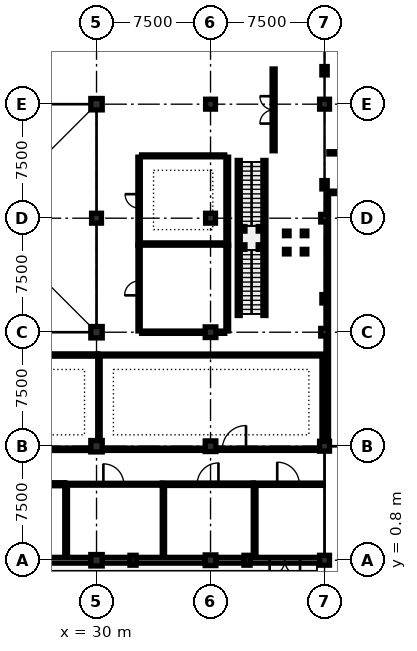
"""IFC4 building model, lengths in metres.
Left out: names, types, materials, properties, quantities, classifications, styles, units other than length and angle.
Written with IfcOpenShell. Run it as: python <this file> out.ifc"""

import sys

from ifc_helpers import new_model, si_unit, direction, frame, frame_2d, origin, origin_2d, place, context, subcontext, project, spatial, rectangle, i_section, extrude, element, fill, save


model = new_model("IFC4")
c1 = context("Model", 3, precision=1e-05, world=origin(), true_north=direction((0.0, 1.0)))
c2 = subcontext(c1, "Body", "Model", "MODEL_VIEW")
j1 = project(units=[si_unit("LENGTHUNIT", "METRE"), si_unit("PLANEANGLEUNIT", "RADIAN")], contexts=[c1])
p1 = place(None, origin())
s1 = spatial("IfcSite", under=j1, at=p1, CompositionType="ELEMENT")
p2 = place(p1, origin())
s2 = spatial("IfcBuilding", under=s1, at=p2, CompositionType="ELEMENT")
p3 = place(p2, origin())
s3 = spatial("IfcBuildingStorey", under=s2, at=p3, CompositionType="ELEMENT", Elevation=0.0)
for number, where, z_axis, x_axis in (
    (1, (30.0, 0.8, 0.0), (0.0, 0.0, 1.0), (1.0, 0.0, 0.0)),
    (2, (30.0, 8.3, 0.0), (0.0, 0.0, 1.0), (1.0, 0.0, 0.0)),
    (3, (30.0, 15.8, 0.0), (0.0, 0.0, 1.0), (1.0, 0.0, 0.0)),
):
    element("IfcColumn", number, at=place(p3, frame(where, z_axis=z_axis, x_axis=x_axis)), inside=s3, PredefinedType="COLUMN", context=c2, shape_type="SweptSolid", body=[
        extrude(rectangle(XDim=0.75, YDim=0.75, at=origin_2d()), origin(), (0.0, 0.0, 1.0), 4.7),
    ])
p4 = place(p3, frame((30.0, 23.3, 0.0), z_axis=(0.0, 0.0, 1.0), x_axis=(1.0, 0.0, 0.0)))
e4 = element("IfcColumn", 4, at=p4, inside=s3, PredefinedType="COLUMN", context=c2, shape_type="SweptSolid", body=[
    extrude(rectangle(XDim=0.65, YDim=0.65, at=origin_2d()), origin(), (0.0, 0.0, 1.0), 4.7),
])
p5 = place(p3, frame((30.0, 30.8, 0.0), z_axis=(0.0, 0.0, 1.0), x_axis=(1.0, 0.0, 0.0)))
e5 = element("IfcColumn", 5, at=p5, inside=s3, PredefinedType="COLUMN", context=c2, shape_type="SweptSolid", body=[
    extrude(rectangle(XDim=0.75, YDim=0.75, at=origin_2d()), origin(), (0.0, 0.0, 1.0), 4.7),
])
for number, where, z_axis, x_axis in (
    (6, (37.5, 0.8, 0.0), (0.0, 0.0, 1.0), (1.0, 0.0, 0.0)),
    (7, (37.5, 8.3, 0.0), (0.0, 0.0, 1.0), (1.0, 0.0, 0.0)),
    (8, (37.5, 15.8, 0.0), (0.0, 0.0, 1.0), (1.0, 0.0, 0.0)),
):
    element("IfcColumn", number, at=place(p3, frame(where, z_axis=z_axis, x_axis=x_axis)), inside=s3, PredefinedType="COLUMN", context=c2, shape_type="SweptSolid", body=[
        extrude(rectangle(XDim=0.7, YDim=0.7, at=origin_2d()), origin(), (0.0, 0.0, 1.0), 4.7),
    ])
for number, where, z_axis, x_axis in (
    (9, (37.5, 23.3, 0.0), (0.0, 0.0, 1.0), (1.0, 0.0, 0.0)),
    (10, (37.5, 30.8, 0.0), (0.0, 0.0, 1.0), (1.0, 0.0, 0.0)),
    (11, (45.0, 0.8, 0.0), (0.0, 0.0, 1.0), (1.0, 0.0, 0.0)),
    (12, (45.0, 8.3, 0.0), (0.0, 0.0, 1.0), (1.0, 0.0, 0.0)),
):
    element("IfcColumn", number, at=place(p3, frame(where, z_axis=z_axis, x_axis=x_axis)), inside=s3, PredefinedType="COLUMN", context=c2, shape_type="SweptSolid", body=[
        extrude(rectangle(XDim=0.65, YDim=0.65, at=origin_2d()), origin(), (0.0, 0.0, 1.0), 4.7),
    ])
for number, where, z_axis, x_axis in (
    (13, (45.0, 15.8, 0.0), (0.0, 0.0, 1.0), (1.0, 0.0, 0.0)),
    (14, (45.0, 23.3, 0.0), (0.0, 0.0, 1.0), (1.0, 0.0, 0.0)),
):
    element("IfcColumn", number, at=place(p3, frame(where, z_axis=z_axis, x_axis=x_axis)), inside=s3, PredefinedType="COLUMN", context=c2, shape_type="SweptSolid", body=[
        extrude(rectangle(XDim=0.5, YDim=0.5, at=origin_2d()), origin(), (0.0, 0.0, 1.0), 6.138),
    ])
p6 = place(p3, frame((45.0, 30.8, 0.0), z_axis=(0.0, 0.0, 1.0), x_axis=(1.0, 0.0, 0.0)))
e15 = element("IfcColumn", 15, at=p6, inside=s3, PredefinedType="COLUMN", context=c2, shape_type="SweptSolid", body=[
    extrude(rectangle(XDim=0.65, YDim=0.65, at=origin_2d()), origin(), (0.0, 0.0, 1.0), 4.7),
])
for number, where, z_axis, x_axis in (
    (16, (32.4, 0.8, 0.0), (0.0, 0.0, 1.0), (1.0, 0.0, 0.0)),
    (17, (39.9, 0.8, 0.0), (0.0, 0.0, 1.0), (1.0, 0.0, 0.0)),
):
    element("IfcColumn", number, at=place(p3, frame(where, z_axis=z_axis, x_axis=x_axis)), inside=s3, PredefinedType="PILASTER", context=c2, shape_type="SweptSolid", body=[
        extrude(rectangle(XDim=0.4, YDim=0.65, at=origin_2d()), origin(), (0.0, 0.0, 1.0), 4.7),
    ])
for number, where, z_axis, x_axis in (
    (18, (45.0, 18.0, 0.0), (0.0, 0.0, 1.0), (1.0, 0.0, 0.0)),
    (19, (45.0, 25.5, 0.0), (0.0, 0.0, 1.0), (1.0, 0.0, 0.0)),
    (20, (45.0, 33.0, 0.0), (0.0, 0.0, 1.0), (1.0, 0.0, 0.0)),
):
    element("IfcColumn", number, at=place(p3, frame(where, z_axis=z_axis, x_axis=x_axis)), inside=s3, PredefinedType="PILASTER", context=c2, shape_type="SweptSolid", body=[
        extrude(rectangle(XDim=0.35, YDim=0.55, at=origin_2d()), origin(), (0.0, 0.0, 1.0), 4.7),
    ])
p7 = place(p3, frame((44.675, 0.8, 0.0), z_axis=(0.0, 0.0, 1.0), x_axis=(-1.0, 0.0, 0.0)))
e21 = element("IfcWall", 21, at=p7, inside=s3, PredefinedType="SOLIDWALL", context=c2, shape_type="SweptSolid", body=[
    extrude(rectangle(XDim=4.575, YDim=0.38, at=frame_2d((2.288, 0.0))), origin(), (0.0, 0.0, 1.0), 4.035),
])
p8 = place(p7, frame((1.288, 0.0, 0.0)))
e22 = element("IfcOpeningElement", 22, at=p8, cuts=e21, PredefinedType="OPENING", context=c2, shape_type="SweptSolid", body=[
    extrude(rectangle(XDim=2.0, YDim=2.35, at=frame_2d((1.0, 1.175))), frame((0.0, 0.202, 0.0), z_axis=(0.0, -1.0, 0.0), x_axis=(1.0, 0.0, 0.0)), (0.0, 0.0, 1.0), 0.404),
])
p9 = place(p3, frame((39.7, 0.8, 0.0), z_axis=(0.0, 0.0, 1.0), x_axis=(-1.0, 0.0, 0.0)))
e23 = element("IfcWall", 23, at=p9, inside=s3, PredefinedType="SOLIDWALL", context=c2, shape_type="SweptSolid", body=[
    extrude(rectangle(XDim=1.85, YDim=0.38, at=frame_2d((0.925, 0.0))), origin(), (0.0, 0.0, 1.0), 4.035),
])
p10 = place(p3, frame((37.15, 0.8, 0.0), z_axis=(0.0, 0.0, 1.0), x_axis=(-1.0, 0.0, 0.0)))
e24 = element("IfcWall", 24, at=p10, inside=s3, PredefinedType="SOLIDWALL", context=c2, shape_type="SweptSolid", body=[
    extrude(rectangle(XDim=4.55, YDim=0.38, at=frame_2d((2.275, 0.0))), origin(), (0.0, 0.0, 1.0), 4.035),
])
p11 = place(p3, frame((32.2, 0.8, 0.0), z_axis=(0.0, 0.0, 1.0), x_axis=(-1.0, 0.0, 0.0)))
e25 = element("IfcWall", 25, at=p11, inside=s3, PredefinedType="SOLIDWALL", context=c2, shape_type="SweptSolid", body=[
    extrude(rectangle(XDim=1.825, YDim=0.38, at=frame_2d((0.913, 0.0))), origin(), (0.0, 0.0, 1.0), 4.035),
])
p12 = place(p3, frame((29.625, 0.8, 0.0), z_axis=(0.0, 0.0, 1.0), x_axis=(-1.0, 0.0, 0.0)))
e26 = element("IfcWall", 26, at=p12, inside=s3, PredefinedType="SOLIDWALL", context=c2, shape_type="SweptSolid", body=[
    extrude(rectangle(XDim=4.525, YDim=0.38, at=frame_2d((2.262, 0.0))), origin(), (0.0, 0.0, 1.0), 4.035),
])
for number, where, z_axis, x_axis in (
    (27, (39.355, 16.9, 0.0), (0.0, 0.0, 1.0), (0.0, 1.0, 0.0)),
    (28, (41.045, 16.9, 0.0), (0.0, 0.0, 1.0), (0.0, 1.0, 0.0)),
):
    element("IfcWall", number, at=place(p3, frame(where, z_axis=z_axis, x_axis=x_axis)), inside=s3, PredefinedType="PARTITIONING", context=c2, shape_type="SweptSolid", body=[
        extrude(rectangle(XDim=10.2, YDim=0.2, at=frame_2d((5.1, 0.0))), origin(), (0.0, 0.0, 1.0), 2.3),
    ])
for number, where, z_axis, x_axis in (
    (29, (39.615, 21.4, 0.0), (0.0, 0.0, 1.0), (1.0, 0.0, 0.0)),
    (30, (40.785, 21.4, 0.0), (0.0, 0.0, 1.0), (1.0, 0.0, 0.0)),
    (31, (40.785, 22.6, 0.0), (0.0, 0.0, 1.0), (1.0, 0.0, 0.0)),
    (32, (39.615, 22.6, 0.0), (0.0, 0.0, 1.0), (1.0, 0.0, 0.0)),
):
    element("IfcColumn", number, at=place(p3, frame(where, z_axis=z_axis, x_axis=x_axis)), inside=s3, PredefinedType="COLUMN", context=c2, shape_type="SweptSolid", body=[
        extrude(i_section(OverallWidth=0.3, OverallDepth=0.3, WebThickness=0.011, FlangeThickness=0.019, FilletRadius=0.027, at=origin_2d()), origin(), (0.0, 0.0, 1.0), 2.3),
    ])
for number, where, z_axis, x_axis in (
    (33, (42.515, 21.1, 0.0), (0.0, 0.0, 1.0), (1.0, 0.0, 0.0)),
    (34, (43.685, 21.1, 0.0), (0.0, 0.0, 1.0), (1.0, 0.0, 0.0)),
    (35, (43.685, 22.3, 0.0), (0.0, 0.0, 1.0), (1.0, 0.0, 0.0)),
    (36, (42.515, 22.3, 0.0), (0.0, 0.0, 1.0), (1.0, 0.0, 0.0)),
):
    element("IfcColumn", number, at=place(p3, frame(where, z_axis=z_axis, x_axis=x_axis)), inside=s3, PredefinedType="COLUMN", context=c2, shape_type="SweptSolid", body=[
        extrude(i_section(OverallWidth=0.3, OverallDepth=0.3, WebThickness=0.011, FlangeThickness=0.019, FilletRadius=0.027, at=origin_2d()), origin(), (0.0, 0.0, 1.0), 4.7),
    ])
p13 = place(p3, frame((21.927, 5.8, 0.0), z_axis=(0.0, 0.0, 1.0), x_axis=(1.0, 0.0, 0.0)))
e37 = element("IfcWall", 37, at=p13, inside=s3, PredefinedType="PARTITIONING", context=c2, shape_type="SweptSolid", body=[
    extrude(rectangle(XDim=5.988, YDim=0.2, at=frame_2d((2.994, 0.0))), origin(), (0.0, 0.0, 1.0), 3.765),
])
p14 = place(p13, frame((2.494, 0.0, 0.0)))
e38 = element("IfcOpeningElement", 38, at=p14, cuts=e37, PredefinedType="OPENING", context=c2, shape_type="SweptSolid", body=[
    extrude(rectangle(XDim=1.0, YDim=2.15, at=frame_2d((0.5, 1.075))), frame((0.0, 0.112, 0.0), z_axis=(0.0, -1.0, 0.0), x_axis=(1.0, 0.0, 0.0)), (0.0, 0.0, 1.0), 0.224),
])
p15 = place(p3, frame((27.927, 5.8, 0.0), z_axis=(0.0, 0.0, 1.0), x_axis=(1.0, 0.0, 0.0)))
e39 = element("IfcWall", 39, at=p15, inside=s3, PredefinedType="PARTITIONING", context=c2, shape_type="SweptSolid", body=[
    extrude(rectangle(XDim=6.388, YDim=0.125, at=frame_2d((3.194, 0.0))), origin(), (0.0, 0.0, 1.0), 3.985),
])
p16 = place(p15, frame((2.524, 0.0, 0.0)))
e40 = element("IfcOpeningElement", 40, at=p16, cuts=e39, PredefinedType="OPENING", context=c2, shape_type="SweptSolid", body=[
    extrude(rectangle(XDim=1.34, YDim=2.24, at=frame_2d((0.67, 1.12))), frame((0.0, 0.074, 0.0), z_axis=(0.0, -1.0, 0.0), x_axis=(1.0, 0.0, 0.0)), (0.0, 0.0, 1.0), 0.149),
])
p17 = place(p3, frame((34.327, 5.8, 0.0), z_axis=(0.0, 0.0, 1.0), x_axis=(1.0, 0.0, 0.0)))
e41 = element("IfcWall", 41, at=p17, inside=s3, PredefinedType="PARTITIONING", context=c2, shape_type="SweptSolid", body=[
    extrude(rectangle(XDim=5.988, YDim=0.16, at=frame_2d((2.994, 0.0))), origin(), (0.0, 0.0, 1.0), 3.985),
])
p18 = place(p17, frame((2.294, 0.0, 0.0)))
e42 = element("IfcOpeningElement", 42, at=p18, cuts=e41, PredefinedType="OPENING", context=c2, shape_type="SweptSolid", body=[
    extrude(rectangle(XDim=1.4, YDim=2.25, at=frame_2d((0.7, 1.125))), frame((0.0, 0.092, 0.0), z_axis=(0.0, -1.0, 0.0), x_axis=(1.0, 0.0, 0.0)), (0.0, 0.0, 1.0), 0.184),
])
p19 = place(p3, frame((40.327, 5.8, 0.0), z_axis=(0.0, 0.0, 1.0), x_axis=(1.0, 0.0, 0.0)))
e43 = element("IfcWall", 43, at=p19, inside=s3, PredefinedType="PARTITIONING", context=c2, shape_type="SweptSolid", body=[
    extrude(rectangle(XDim=4.571, YDim=0.15, at=frame_2d((2.286, 0.0))), origin(), (0.0, 0.0, 1.0), 4.035),
])
p20 = place(p19, frame((1.561, 0.0, 0.0)))
e44 = element("IfcOpeningElement", 44, at=p20, cuts=e43, PredefinedType="OPENING", context=c2, shape_type="SweptSolid", body=[
    extrude(rectangle(XDim=1.45, YDim=2.26, at=frame_2d((0.725, 1.13))), frame((0.0, 0.087, 0.0), z_axis=(0.0, -1.0, 0.0), x_axis=(1.0, 0.0, 0.0)), (0.0, 0.0, 1.0), 0.174),
])
p21 = place(p3, frame((15.387, 8.1, 0.0), z_axis=(0.0, 0.0, 1.0), x_axis=(1.0, 0.0, 0.0)))
e45 = element("IfcWall", 45, at=p21, inside=s3, PredefinedType="PARTITIONING", context=c2, shape_type="SweptSolid", body=[
    extrude(rectangle(XDim=14.521, YDim=0.16, at=frame_2d((7.26, 0.0))), origin(), (0.0, 0.0, 1.0), 3.765),
])
p22 = place(p21, frame((7.682, 0.0, 0.0)))
e46 = element("IfcOpeningElement", 46, at=p22, cuts=e45, PredefinedType="OPENING", context=c2, shape_type="SweptSolid", body=[
    extrude(rectangle(XDim=1.5, YDim=2.28, at=frame_2d((0.75, 1.14))), frame((0.0, 0.092, 0.0), z_axis=(0.0, -1.0, 0.0), x_axis=(1.0, 0.0, 0.0)), (0.0, 0.0, 1.0), 0.184),
])
p23 = place(p3, frame((30.387, 8.1, 0.0), z_axis=(0.0, 0.0, 1.0), x_axis=(1.0, 0.0, 0.0)))
e47 = element("IfcWall", 47, at=p23, inside=s3, PredefinedType="PARTITIONING", context=c2, shape_type="SweptSolid", body=[
    extrude(rectangle(XDim=14.281, YDim=0.15, at=frame_2d((7.141, 0.0))), origin(), (0.0, 0.0, 1.0), 3.985),
])
p24 = place(p23, frame((7.887, 0.0, 0.0)))
e48 = element("IfcOpeningElement", 48, at=p24, cuts=e47, PredefinedType="OPENING", context=c2, shape_type="SweptSolid", body=[
    extrude(rectangle(XDim=1.56, YDim=2.3, at=frame_2d((0.78, 1.15))), frame((0.0, 0.087, 0.0), z_axis=(0.0, -1.0, 0.0), x_axis=(1.0, 0.0, 0.0)), (0.0, 0.0, 1.0), 0.174),
])
p25 = place(p3, frame((41.65, 27.735, 0.0), z_axis=(0.0, 0.0, 1.0), x_axis=(0.0, 1.0, 0.0)))
e49 = element("IfcWall", 49, at=p25, inside=s3, PredefinedType="PARTITIONING", context=c2, shape_type="SweptSolid", body=[
    extrude(rectangle(XDim=5.38, YDim=0.2, at=frame_2d((2.69, 0.0))), origin(), (0.0, 0.0, 1.0), 3.985),
])
p26 = place(p25, frame((1.79, 0.0, 0.0)))
e50 = element("IfcOpeningElement", 50, at=p26, cuts=e49, PredefinedType="OPENING", context=c2, shape_type="SweptSolid", body=[
    extrude(rectangle(XDim=1.8, YDim=2.15, at=frame_2d((0.9, 1.075))), frame((0.0, 0.112, 0.0), z_axis=(0.0, -1.0, 0.0), x_axis=(1.0, 0.0, 0.0)), (0.0, 0.0, 1.0), 0.224),
])
p27 = place(p3, frame((32.8, 15.885, 0.0), z_axis=(0.0, 0.0, 1.0), x_axis=(0.0, 1.0, 0.0)))
e51 = element("IfcWall", 51, at=p27, inside=s3, PredefinedType="PARTITIONING", context=c2, shape_type="SweptSolid", body=[
    extrude(rectangle(XDim=5.63, YDim=0.15, at=frame_2d((2.815, 0.0))), origin(), (0.0, 0.0, 1.0), 3.985),
])
p28 = place(p27, frame((2.34, 0.0, 0.0)))
e52 = element("IfcOpeningElement", 52, at=p28, cuts=e51, PredefinedType="OPENING", context=c2, shape_type="SweptSolid", body=[
    extrude(rectangle(XDim=0.95, YDim=2.15, at=frame_2d((0.475, 1.075))), frame((0.0, 0.087, 0.0), z_axis=(0.0, -1.0, 0.0), x_axis=(1.0, 0.0, 0.0)), (0.0, 0.0, 1.0), 0.174),
])
p29 = place(p3, frame((32.8, 21.527, 0.0), z_axis=(0.0, 0.0, 1.0), x_axis=(0.0, 1.0, 0.0)))
e53 = element("IfcWall", 53, at=p29, inside=s3, PredefinedType="PARTITIONING", context=c2, shape_type="SweptSolid", body=[
    extrude(rectangle(XDim=5.788, YDim=0.16, at=frame_2d((2.894, 0.0))), origin(), (0.0, 0.0, 1.0), 3.985),
])
p30 = place(p29, frame((2.434, 0.0, 0.0)))
e54 = element("IfcOpeningElement", 54, at=p30, cuts=e53, PredefinedType="OPENING", context=c2, shape_type="SweptSolid", body=[
    extrude(rectangle(XDim=0.92, YDim=2.1, at=frame_2d((0.46, 1.05))), frame((0.0, 0.092, 0.0), z_axis=(0.0, -1.0, 0.0), x_axis=(1.0, 0.0, 0.0)), (0.0, 0.0, 1.0), 0.184),
])
p31 = place(p3, frame((45.285, 25.0, 0.0), z_axis=(0.0, 0.0, 1.0), x_axis=(1.0, 0.0, 0.0)))
e55 = element("IfcWall", 55, at=p31, inside=s3, PredefinedType="PARTITIONING", context=c2, shape_type="SweptSolid", body=[
    extrude(rectangle(XDim=7.13, YDim=0.16, at=frame_2d((3.565, 0.0))), origin(), (0.0, 0.0, 1.0), 4.321),
])
p32 = place(p31, frame((3.025, 0.0, 0.0)))
e56 = element("IfcOpeningElement", 56, at=p32, cuts=e55, PredefinedType="OPENING", context=c2, shape_type="SweptSolid", body=[
    extrude(rectangle(XDim=1.08, YDim=2.18, at=frame_2d((0.54, 1.09))), frame((0.0, 0.092, 0.0), z_axis=(0.0, -1.0, 0.0), x_axis=(1.0, 0.0, 0.0)), (0.0, 0.0, 1.0), 0.184),
])
p33 = place(p3, frame((45.285, 27.6, 0.0), z_axis=(0.0, 0.0, 1.0), x_axis=(1.0, 0.0, 0.0)))
e57 = element("IfcWall", 57, at=p33, inside=s3, PredefinedType="PARTITIONING", context=c2, shape_type="SweptSolid", body=[
    extrude(rectangle(XDim=5.03, YDim=0.15, at=frame_2d((2.515, 0.0))), origin(), (0.0, 0.0, 1.0), 4.7),
])
p34 = place(p33, frame((1.895, 0.0, 0.0)))
e58 = element("IfcOpeningElement", 58, at=p34, cuts=e57, PredefinedType="OPENING", context=c2, shape_type="SweptSolid", body=[
    extrude(rectangle(XDim=1.24, YDim=2.2, at=frame_2d((0.62, 1.1))), frame((0.0, 0.087, 0.0), z_axis=(0.0, -1.0, 0.0), x_axis=(1.0, 0.0, 0.0)), (0.0, 0.0, 1.0), 0.174),
])
p35 = place(p3, frame((15.485, 14.3, 0.0), z_axis=(0.0, 0.0, 1.0), x_axis=(1.0, 0.0, 0.0)))
e59 = element("IfcWall", 59, at=p35, inside=s3, PredefinedType="PARTITIONING", context=c2, shape_type="SweptSolid", body=[
    extrude(rectangle(XDim=14.59, YDim=0.15, at=frame_2d((7.295, 0.0))), origin(), (0.0, 0.0, 1.0), 3.765),
])
p36 = place(p3, frame((30.087, 14.3, 0.0), z_axis=(0.0, 0.0, 1.0), x_axis=(1.0, 0.0, 0.0)))
e60 = element("IfcWall", 60, at=p36, inside=s3, PredefinedType="PARTITIONING", context=c2, shape_type="SweptSolid", body=[
    extrude(rectangle(XDim=14.748, YDim=0.125, at=frame_2d((7.374, 0.0))), origin(), (0.0, 0.0, 1.0), 3.985),
])
p37 = place(p3, frame((38.6, 15.885, 0.0), z_axis=(0.0, 0.0, 1.0), x_axis=(0.0, 1.0, 0.0)))
e61 = element("IfcWall", 61, at=p37, inside=s3, PredefinedType="PARTITIONING", context=c2, shape_type="SweptSolid", body=[
    extrude(rectangle(XDim=5.63, YDim=0.18, at=frame_2d((2.815, 0.0))), origin(), (0.0, 0.0, 1.0), 4.7),
])
p38 = place(p3, frame((38.6, 21.527, 0.0), z_axis=(0.0, 0.0, 1.0), x_axis=(0.0, 1.0, 0.0)))
e62 = element("IfcWall", 62, at=p38, inside=s3, PredefinedType="PARTITIONING", context=c2, shape_type="SweptSolid", body=[
    extrude(rectangle(XDim=5.788, YDim=0.18, at=frame_2d((2.894, 0.0))), origin(), (0.0, 0.0, 1.0), 4.7),
])
p39 = place(p3, frame((28.0, 1.002, 0.0), z_axis=(0.0, 0.0, 1.0), x_axis=(0.0, 1.0, 0.0)))
e63 = element("IfcWall", 63, at=p39, inside=s3, PredefinedType="PARTITIONING", context=c2, shape_type="SweptSolid", body=[
    extrude(rectangle(XDim=4.724, YDim=0.18, at=frame_2d((2.362, 0.0))), origin(), (0.0, 0.0, 1.0), 4.035),
])
p40 = place(p3, frame((34.4, 1.002, 0.0), z_axis=(0.0, 0.0, 1.0), x_axis=(0.0, 1.0, 0.0)))
e64 = element("IfcWall", 64, at=p40, inside=s3, PredefinedType="PARTITIONING", context=c2, shape_type="SweptSolid", body=[
    extrude(rectangle(XDim=4.706, YDim=0.15, at=frame_2d((2.353, 0.0))), origin(), (0.0, 0.0, 1.0), 4.035),
])
p41 = place(p3, frame((40.4, 1.002, 0.0), z_axis=(0.0, 0.0, 1.0), x_axis=(0.0, 1.0, 0.0)))
e65 = element("IfcWall", 65, at=p41, inside=s3, PredefinedType="PARTITIONING", context=c2, shape_type="SweptSolid", body=[
    extrude(rectangle(XDim=4.711, YDim=0.18, at=frame_2d((2.355, 0.0))), origin(), (0.0, 0.0, 1.0), 4.035),
])
p42 = place(p3, frame((30.16, 8.432, 0.0), z_axis=(0.0, 0.0, 1.0), x_axis=(0.0, 1.0, 0.0)))
e66 = element("IfcWall", 66, at=p42, inside=s3, PredefinedType="PARTITIONING", context=c2, shape_type="SweptSolid", body=[
    extrude(rectangle(XDim=5.794, YDim=0.16, at=frame_2d((2.897, 0.0))), origin(), (0.0, 0.0, 1.0), 3.985),
])
p43 = place(p3, frame((44.92, 8.432, 0.0), z_axis=(0.0, 0.0, 1.0), x_axis=(0.0, 1.0, 0.0)))
e67 = element("IfcWall", 67, at=p43, inside=s3, PredefinedType="PARTITIONING", context=c2, shape_type="SweptSolid", body=[
    extrude(rectangle(XDim=5.703, YDim=0.18, at=frame_2d((2.852, 0.0))), origin(), (0.0, 0.0, 1.0), 3.985),
])
p44 = place(p3, frame((32.965, 15.8, 0.0), z_axis=(0.0, 0.0, 1.0), x_axis=(1.0, 0.0, 0.0)))
e68 = element("IfcWall", 68, at=p44, inside=s3, PredefinedType="PARTITIONING", context=c2, shape_type="SweptSolid", body=[
    extrude(rectangle(XDim=5.47, YDim=0.15, at=frame_2d((2.735, 0.0))), origin(), (0.0, 0.0, 1.0), 3.985),
])
p45 = place(p3, frame((32.892, 21.6, 0.0), z_axis=(0.0, 0.0, 1.0), x_axis=(1.0, 0.0, 0.0)))
e69 = element("IfcWall", 69, at=p45, inside=s3, PredefinedType="PARTITIONING", context=c2, shape_type="SweptSolid", body=[
    extrude(rectangle(XDim=5.606, YDim=0.15, at=frame_2d((2.803, 0.0))), origin(), (0.0, 0.0, 1.0), 3.985),
])
p46 = place(p3, frame((32.965, 27.4, 0.0), z_axis=(0.0, 0.0, 1.0), x_axis=(1.0, 0.0, 0.0)))
e70 = element("IfcWall", 70, at=p46, inside=s3, PredefinedType="PARTITIONING", context=c2, shape_type="SweptSolid", body=[
    extrude(rectangle(XDim=5.47, YDim=0.125, at=frame_2d((2.735, 0.0))), origin(), (0.0, 0.0, 1.0), 3.985),
])
p47 = place(p3, frame((45.2, 8.637, 0.0), z_axis=(0.0, 0.0, 1.0), x_axis=(0.0, 1.0, 0.0)))
e71 = element("IfcWall", 71, at=p47, inside=s3, PredefinedType="PARTITIONING", context=c2, shape_type="SweptSolid", body=[
    extrude(rectangle(XDim=16.198, YDim=0.125, at=frame_2d((8.099, 0.0))), origin(), (0.0, 0.0, 1.0), 3.985),
])
p48 = place(p8, origin())
e72 = element("IfcDoor", 72, at=p48, inside=s3, OperationType="DOUBLE_DOOR_SINGLE_SWING", PredefinedType="DOOR", context=c2, shape_type="SweptSolid", body=[
    extrude(rectangle(XDim=2.0, YDim=2.35, at=frame_2d((1.0, 1.175))), frame((0.0, 0.025, 0.0), z_axis=(0.0, -1.0, 0.0), x_axis=(1.0, 0.0, 0.0)), (0.0, 0.0, 1.0), 0.05),
])
fill(e22, e72)
p49 = place(p16, origin())
e73 = element("IfcDoor", 73, at=p49, inside=s3, OperationType="SINGLE_SWING_LEFT", PredefinedType="DOOR", context=c2, shape_type="SweptSolid", body=[
    extrude(rectangle(XDim=1.34, YDim=2.24, at=frame_2d((0.67, 1.12))), frame((0.0, 0.025, 0.0), z_axis=(0.0, -1.0, 0.0), x_axis=(1.0, 0.0, 0.0)), (0.0, 0.0, 1.0), 0.05),
])
fill(e40, e73)
p50 = place(p18, origin())
e74 = element("IfcDoor", 74, at=p50, inside=s3, OperationType="SINGLE_SWING_RIGHT", PredefinedType="DOOR", context=c2, shape_type="SweptSolid", body=[
    extrude(rectangle(XDim=1.4, YDim=2.25, at=frame_2d((0.7, 1.125))), frame((0.0, 0.025, 0.0), z_axis=(0.0, -1.0, 0.0), x_axis=(1.0, 0.0, 0.0)), (0.0, 0.0, 1.0), 0.05),
])
fill(e42, e74)
p51 = place(p20, origin())
e75 = element("IfcDoor", 75, at=p51, inside=s3, OperationType="SINGLE_SWING_LEFT", PredefinedType="DOOR", context=c2, shape_type="SweptSolid", body=[
    extrude(rectangle(XDim=1.45, YDim=2.26, at=frame_2d((0.725, 1.13))), frame((0.0, 0.025, 0.0), z_axis=(0.0, -1.0, 0.0), x_axis=(1.0, 0.0, 0.0)), (0.0, 0.0, 1.0), 0.05),
])
fill(e44, e75)
p52 = place(p24, origin())
e76 = element("IfcDoor", 76, at=p52, inside=s3, OperationType="SINGLE_SWING_RIGHT", PredefinedType="DOOR", context=c2, shape_type="SweptSolid", body=[
    extrude(rectangle(XDim=1.56, YDim=2.3, at=frame_2d((0.78, 1.15))), frame((0.0, 0.025, 0.0), z_axis=(0.0, -1.0, 0.0), x_axis=(1.0, 0.0, 0.0)), (0.0, 0.0, 1.0), 0.05),
])
fill(e48, e76)
p53 = place(p26, origin())
e77 = element("IfcDoor", 77, at=p53, inside=s3, OperationType="DOUBLE_DOOR_SINGLE_SWING", PredefinedType="DOOR", context=c2, shape_type="SweptSolid", body=[
    extrude(rectangle(XDim=1.8, YDim=2.15, at=frame_2d((0.9, 1.075))), frame((0.0, 0.025, 0.0), z_axis=(0.0, -1.0, 0.0), x_axis=(1.0, 0.0, 0.0)), (0.0, 0.0, 1.0), 0.05),
])
fill(e50, e77)
p54 = place(p28, origin())
e78 = element("IfcDoor", 78, at=p54, inside=s3, OperationType="SINGLE_SWING_LEFT", PredefinedType="DOOR", context=c2, shape_type="SweptSolid", body=[
    extrude(rectangle(XDim=0.95, YDim=2.15, at=frame_2d((0.475, 1.075))), frame((0.0, 0.025, 0.0), z_axis=(0.0, -1.0, 0.0), x_axis=(1.0, 0.0, 0.0)), (0.0, 0.0, 1.0), 0.05),
])
fill(e52, e78)
p55 = place(p30, origin())
e79 = element("IfcDoor", 79, at=p55, inside=s3, OperationType="SINGLE_SWING_RIGHT", PredefinedType="DOOR", context=c2, shape_type="SweptSolid", body=[
    extrude(rectangle(XDim=0.92, YDim=2.1, at=frame_2d((0.46, 1.05))), frame((0.0, 0.025, 0.0), z_axis=(0.0, -1.0, 0.0), x_axis=(1.0, 0.0, 0.0)), (0.0, 0.0, 1.0), 0.05),
])
fill(e54, e79)
save(model, sys.argv[1])
